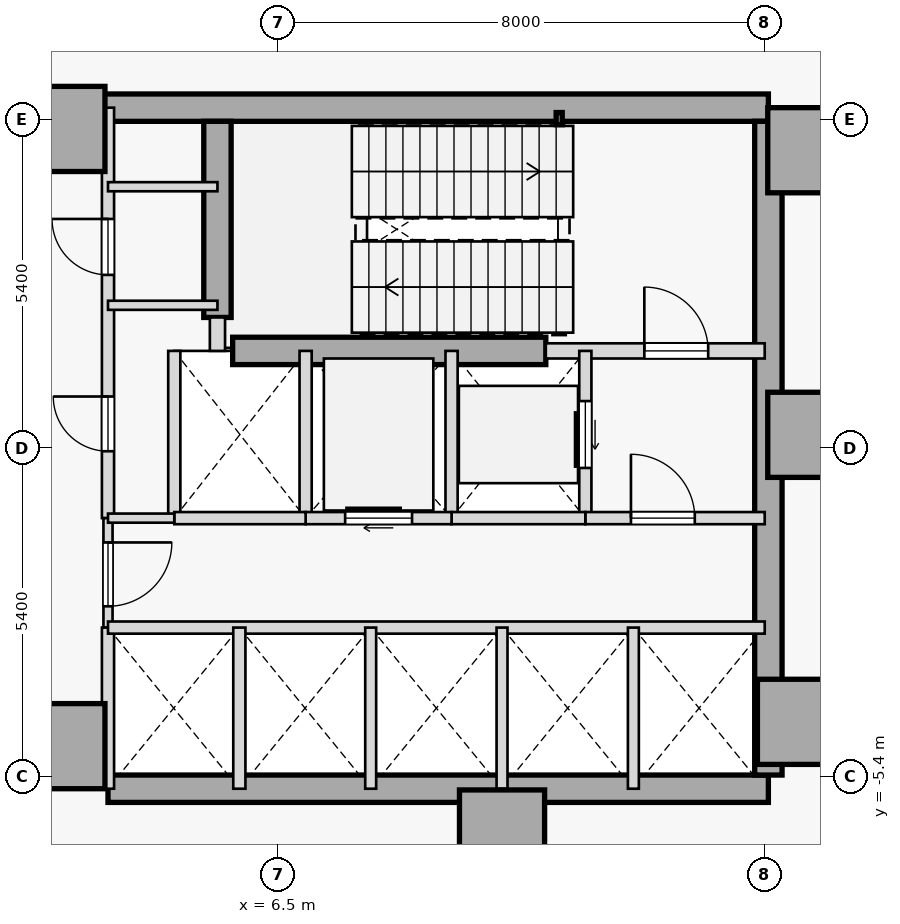
"""IFC4 building model, lengths in metres.
Left out: names, types, materials, properties, quantities, classifications, styles, units other than length and angle.
Written with IfcOpenShell. Run it as: python <this file> out.ifc"""

import sys

from ifc_helpers import new_model, si_unit, direction, frame, frame_2d, origin, origin_2d, place, context, subcontext, project, spatial, rectangle, hollow_rectangle, extrude, element, fill, save


model = new_model("IFC4")
c1 = context("Model", 3, precision=1e-05, world=origin(), true_north=direction((0.0, 1.0)))
c2 = subcontext(c1, "Body", "Model", "MODEL_VIEW")
j1 = project(units=[si_unit("LENGTHUNIT", "METRE"), si_unit("PLANEANGLEUNIT", "RADIAN")], contexts=[c1])
p1 = place(None, origin())
s1 = spatial("IfcSite", under=j1, at=p1, CompositionType="ELEMENT")
p2 = place(p1, origin())
s2 = spatial("IfcBuilding", under=s1, at=p2, CompositionType="ELEMENT")
p3 = place(p2, frame((0.0, 0.0, 9.6)))
s3 = spatial("IfcBuildingStorey", under=s2, at=p3, CompositionType="ELEMENT", Elevation=9.6)
for number, where, z_axis, x_axis in (
    (1, (15.25, 4.9, 0.0), (0.0, 0.0, 1.0), (1.0, 0.0, 0.0)),
    (2, (15.25, 0.22, 0.0), (0.0, 0.0, 1.0), (1.0, 0.0, 0.0)),
    (3, (15.08, -4.5, 0.0), (0.0, 0.0, 1.0), (1.0, 0.0, 0.0)),
    (4, (10.18, -6.32, 0.0), (0.0, 0.0, 1.0), (1.0, 0.0, 0.0)),
    (5, (2.95, -4.9, 0.0), (0.0, 0.0, 1.0), (1.0, 0.0, 0.0)),
    (6, (2.95, 5.25, 0.0), (0.0, 0.0, 1.0), (1.0, 0.0, 0.0)),
):
    element("IfcColumn", number, at=place(p3, frame(where, z_axis=z_axis, x_axis=x_axis)), inside=s3, PredefinedType="COLUMN", context=c2, shape_type="SweptSolid", body=[
        extrude(rectangle(XDim=1.4, YDim=1.4, at=origin_2d()), origin(), (0.0, 0.0, 1.0), 4.6),
    ])
p4 = place(p3, frame((3.15, 5.6, 0.0), z_axis=(0.0, 0.0, 1.0), x_axis=(1.0, 0.0, 0.0)))
e7 = element("IfcWall", 7, at=p4, inside=s3, PredefinedType="SHEAR", context=c2, shape_type="SweptSolid", body=[
    extrude(rectangle(XDim=11.41, YDim=0.45, at=frame_2d((5.705, 0.0))), origin(), (0.0, 0.0, 1.0), 4.375),
])
p5 = place(p3, frame((3.7, -5.6, 0.0), z_axis=(0.0, 0.0, 1.0), x_axis=(1.0, 0.0, 0.0)))
e8 = element("IfcWall", 8, at=p5, inside=s3, PredefinedType="SHEAR", context=c2, shape_type="SweptSolid", body=[
    extrude(rectangle(XDim=10.86, YDim=0.45, at=frame_2d((5.43, 0.0))), origin(), (0.0, 0.0, 1.0), 4.375),
])
p6 = place(p3, frame((14.56, -5.375, 0.0), z_axis=(0.0, 0.0, 1.0), x_axis=(0.0, 1.0, 0.0)))
e9 = element("IfcWall", 9, at=p6, inside=s3, PredefinedType="SHEAR", context=c2, shape_type="SweptSolid", body=[
    extrude(rectangle(XDim=10.75, YDim=0.45, at=frame_2d((5.375, 0.0))), origin(), (0.0, 0.0, 1.0), 4.375),
])
p7 = place(p3, frame((5.5, 2.15, 0.0), z_axis=(0.0, 0.0, 1.0), x_axis=(0.0, 1.0, 0.0)))
e10 = element("IfcWall", 10, at=p7, inside=s3, PredefinedType="SHEAR", context=c2, shape_type="SweptSolid", body=[
    extrude(rectangle(XDim=3.225, YDim=0.45, at=frame_2d((1.613, 0.0))), origin(), (0.0, 0.0, 1.0), 4.375),
])
p8 = place(p3, frame((5.75, 1.6, 0.0), z_axis=(0.0, 0.0, 1.0), x_axis=(1.0, 0.0, 0.0)))
e11 = element("IfcWall", 11, at=p8, inside=s3, PredefinedType="SHEAR", context=c2, shape_type="SweptSolid", body=[
    extrude(rectangle(XDim=5.15, YDim=0.45, at=frame_2d((2.575, 0.0))), origin(), (0.0, 0.0, 1.0), 4.375),
])
p9 = place(p3, frame((11.12, 5.42, 0.0), z_axis=(0.0, 0.0, 1.0), x_axis=(1.0, 0.0, 0.0)))
e12 = element("IfcColumn", 12, at=p9, inside=s3, PredefinedType="COLUMN", context=c2, shape_type="SweptSolid", body=[
    extrude(hollow_rectangle(XDim=0.1, YDim=0.2, WallThickness=0.008, at=origin_2d()), origin(), (0.0, 0.0, 1.0), 4.6),
])
p10 = place(p3, frame((10.9, 1.6, 0.0), z_axis=(0.0, 0.0, 1.0), x_axis=(1.0, 0.0, 0.0)))
e13 = element("IfcWall", 13, at=p10, inside=s3, PredefinedType="STANDARD", context=c2, shape_type="SweptSolid", body=[
    extrude(rectangle(XDim=3.6, YDim=0.25, at=frame_2d((1.8, 0.0))), origin(), (0.0, 0.0, 1.0), 4.375),
])
p11 = place(p10, frame((1.62, 0.0, 0.0)))
e14 = element("IfcOpeningElement", 14, at=p11, cuts=e13, PredefinedType="OPENING", context=c2, shape_type="SweptSolid", body=[
    extrude(rectangle(XDim=1.05, YDim=2.15, at=frame_2d((0.525, 1.075))), frame((0.0, 0.135, 0.0), z_axis=(0.0, -1.0, 0.0), x_axis=(1.0, 0.0, 0.0)), (0.0, 0.0, 1.0), 0.27),
])
p12 = place(p3, frame((5.5, 1.6, 0.0), z_axis=(0.0, 0.0, 1.0), x_axis=(0.0, 1.0, 0.0)))
e15 = element("IfcWall", 15, at=p12, inside=s3, PredefinedType="STANDARD", context=c2, shape_type="SweptSolid", body=[
    extrude(rectangle(XDim=0.55, YDim=0.25, at=frame_2d((0.275, 0.0))), origin(), (0.0, 0.0, 1.0), 4.375),
])
p13 = place(p3, frame((3.7, -1.15, 0.0), z_axis=(0.0, 0.0, 1.0), x_axis=(0.0, 1.0, 0.0)))
e16 = element("IfcWall", 16, at=p13, inside=s3, PredefinedType="STANDARD", context=c2, shape_type="SweptSolid", body=[
    extrude(rectangle(XDim=6.75, YDim=0.2, at=frame_2d((3.375, 0.0))), origin(), (0.0, 0.0, 1.0), 4.375),
])
p14 = place(p13, frame((1.1, 0.0, 0.0)))
e17 = element("IfcOpeningElement", 17, at=p14, cuts=e16, PredefinedType="OPENING", context=c2, shape_type="SweptSolid", body=[
    extrude(rectangle(XDim=0.9, YDim=2.15, at=frame_2d((0.45, 1.075))), frame((0.0, 0.11, 0.0), z_axis=(0.0, -1.0, 0.0), x_axis=(1.0, 0.0, 0.0)), (0.0, 0.0, 1.0), 0.22),
])
p15 = place(p13, frame((4.0, 0.0, 0.0)))
e18 = element("IfcOpeningElement", 18, at=p15, cuts=e16, PredefinedType="OPENING", context=c2, shape_type="SweptSolid", body=[
    extrude(rectangle(XDim=0.92, YDim=2.15, at=frame_2d((0.46, 1.075))), frame((0.0, 0.11, 0.0), z_axis=(0.0, -1.0, 0.0), x_axis=(1.0, 0.0, 0.0)), (0.0, 0.0, 1.0), 0.22),
])
p16 = place(p3, frame((3.7, -2.95, 0.0), z_axis=(0.0, 0.0, 1.0), x_axis=(0.0, 1.0, 0.0)))
e19 = element("IfcWall", 19, at=p16, inside=s3, PredefinedType="PARTITIONING", context=c2, shape_type="SweptSolid", body=[
    extrude(rectangle(XDim=1.8, YDim=0.15, at=frame_2d((0.9, 0.0))), origin(), (0.0, 0.0, 1.0), 4.375),
])
p17 = place(p16, frame((0.35, 0.0, 0.0)))
e20 = element("IfcOpeningElement", 20, at=p17, cuts=e19, PredefinedType="OPENING", context=c2, shape_type="SweptSolid", body=[
    extrude(rectangle(XDim=1.05, YDim=2.18, at=frame_2d((0.525, 1.09))), frame((0.0, 0.085, 0.0), z_axis=(0.0, -1.0, 0.0), x_axis=(1.0, 0.0, 0.0)), (0.0, 0.0, 1.0), 0.17),
])
p18 = place(p3, frame((3.7, -5.6, 0.0), z_axis=(0.0, 0.0, 1.0), x_axis=(0.0, 1.0, 0.0)))
e21 = element("IfcWall", 21, at=p18, inside=s3, PredefinedType="STANDARD", context=c2, shape_type="SweptSolid", body=[
    extrude(rectangle(XDim=2.65, YDim=0.2, at=frame_2d((1.325, 0.0))), origin(), (0.0, 0.0, 1.0), 4.375),
])
p19 = place(p3, frame((11.55, -1.15, 0.0), z_axis=(0.0, 0.0, 1.0), x_axis=(0.0, 1.0, 0.0)))
e22 = element("IfcWall", 22, at=p19, inside=s3, PredefinedType="STANDARD", context=c2, shape_type="SweptSolid", body=[
    extrude(rectangle(XDim=2.75, YDim=0.2, at=frame_2d((1.375, 0.0))), origin(), (0.0, 0.0, 1.0), 4.375),
])
p20 = place(p19, frame((0.825, 0.0, 0.0)))
e23 = element("IfcOpeningElement", 23, at=p20, cuts=e22, PredefinedType="OPENING", context=c2, shape_type="SweptSolid", body=[
    extrude(rectangle(XDim=1.1, YDim=2.15, at=frame_2d((0.55, 1.075))), frame((0.0, 0.11, 0.0), z_axis=(0.0, -1.0, 0.0), x_axis=(1.0, 0.0, 0.0)), (0.0, 0.0, 1.0), 0.22),
])
p21 = place(p3, frame((9.35, -1.15, 0.0), z_axis=(0.0, 0.0, 1.0), x_axis=(0.0, 1.0, 0.0)))
e24 = element("IfcWall", 24, at=p21, inside=s3, PredefinedType="STANDARD", context=c2, shape_type="SweptSolid", body=[
    extrude(rectangle(XDim=2.75, YDim=0.2, at=frame_2d((1.375, 0.0))), origin(), (0.0, 0.0, 1.0), 4.375),
])
p22 = place(p3, frame((11.55, -1.15, 0.0), z_axis=(0.0, 0.0, 1.0), x_axis=(1.0, 0.0, 0.0)))
e25 = element("IfcWall", 25, at=p22, inside=s3, PredefinedType="STANDARD", context=c2, shape_type="SweptSolid", body=[
    extrude(rectangle(XDim=2.95, YDim=0.2, at=frame_2d((1.475, 0.0))), origin(), (0.0, 0.0, 1.0), 4.375),
])
p23 = place(p22, frame((0.75, 0.0, 0.0)))
e26 = element("IfcOpeningElement", 26, at=p23, cuts=e25, PredefinedType="OPENING", context=c2, shape_type="SweptSolid", body=[
    extrude(rectangle(XDim=1.05, YDim=2.18, at=frame_2d((0.525, 1.09))), frame((0.0, 0.11, 0.0), z_axis=(0.0, -1.0, 0.0), x_axis=(1.0, 0.0, 0.0)), (0.0, 0.0, 1.0), 0.22),
])
p24 = place(p3, frame((9.35, -1.15, 0.0), z_axis=(0.0, 0.0, 1.0), x_axis=(1.0, 0.0, 0.0)))
e27 = element("IfcWall", 27, at=p24, inside=s3, PredefinedType="STANDARD", context=c2, shape_type="SweptSolid", body=[
    extrude(rectangle(XDim=2.2, YDim=0.2, at=frame_2d((1.1, 0.0))), origin(), (0.0, 0.0, 1.0), 4.375),
])
p25 = place(p3, frame((6.95, -1.15, 0.0), z_axis=(0.0, 0.0, 1.0), x_axis=(0.0, 1.0, 0.0)))
e28 = element("IfcWall", 28, at=p25, inside=s3, PredefinedType="STANDARD", context=c2, shape_type="SweptSolid", body=[
    extrude(rectangle(XDim=2.75, YDim=0.2, at=frame_2d((1.375, 0.0))), origin(), (0.0, 0.0, 1.0), 4.375),
])
p26 = place(p3, frame((6.95, -1.15, 0.0), z_axis=(0.0, 0.0, 1.0), x_axis=(1.0, 0.0, 0.0)))
e29 = element("IfcWall", 29, at=p26, inside=s3, PredefinedType="STANDARD", context=c2, shape_type="SweptSolid", body=[
    extrude(rectangle(XDim=2.4, YDim=0.2, at=frame_2d((1.2, 0.0))), origin(), (0.0, 0.0, 1.0), 4.375),
])
p27 = place(p26, frame((0.65, 0.0, 0.0)))
e30 = element("IfcOpeningElement", 30, at=p27, cuts=e29, PredefinedType="OPENING", context=c2, shape_type="SweptSolid", body=[
    extrude(rectangle(XDim=1.1, YDim=2.15, at=frame_2d((0.55, 1.075))), frame((0.0, 0.11, 0.0), z_axis=(0.0, -1.0, 0.0), x_axis=(1.0, 0.0, 0.0)), (0.0, 0.0, 1.0), 0.22),
])
p28 = place(p3, frame((4.79, -1.15, 0.0), z_axis=(0.0, 0.0, 1.0), x_axis=(0.0, 1.0, 0.0)))
e31 = element("IfcWall", 31, at=p28, inside=s3, PredefinedType="STANDARD", context=c2, shape_type="SweptSolid", body=[
    extrude(rectangle(XDim=2.75, YDim=0.2, at=frame_2d((1.375, 0.0))), origin(), (0.0, 0.0, 1.0), 4.375),
])
p29 = place(p3, frame((4.79, -1.15, 0.0), z_axis=(0.0, 0.0, 1.0), x_axis=(1.0, 0.0, 0.0)))
e32 = element("IfcWall", 32, at=p29, inside=s3, PredefinedType="STANDARD", context=c2, shape_type="SweptSolid", body=[
    extrude(rectangle(XDim=2.16, YDim=0.2, at=frame_2d((1.08, 0.0))), origin(), (0.0, 0.0, 1.0), 4.375),
])
p30 = place(p3, frame((3.7, -1.15, 0.0), z_axis=(0.0, 0.0, 1.0), x_axis=(1.0, 0.0, 0.0)))
e33 = element("IfcWall", 33, at=p30, inside=s3, PredefinedType="PARTITIONING", context=c2, shape_type="SweptSolid", body=[
    extrude(rectangle(XDim=1.09, YDim=0.15, at=frame_2d((0.545, 0.0))), origin(), (0.0, 0.0, 1.0), 4.375),
])
p31 = place(p3, frame((3.7, -2.95, 0.0), z_axis=(0.0, 0.0, 1.0), x_axis=(1.0, 0.0, 0.0)))
e34 = element("IfcWall", 34, at=p31, inside=s3, PredefinedType="STANDARD", context=c2, shape_type="SweptSolid", body=[
    extrude(rectangle(XDim=10.8, YDim=0.2, at=frame_2d((5.4, 0.0))), origin(), (0.0, 0.0, 1.0), 4.375),
])
p32 = place(p3, frame((5.86, -5.6, 0.0), z_axis=(0.0, 0.0, 1.0), x_axis=(0.0, 1.0, 0.0)))
e35 = element("IfcWall", 35, at=p32, inside=s3, PredefinedType="STANDARD", context=c2, shape_type="SweptSolid", body=[
    extrude(rectangle(XDim=2.65, YDim=0.2, at=frame_2d((1.325, 0.0))), origin(), (0.0, 0.0, 1.0), 4.375),
])
for number, where, z_axis, x_axis in (
    (36, (12.34, -5.6, 0.0), (0.0, 0.0, 1.0), (0.0, 1.0, 0.0)),
    (37, (10.18, -5.6, 0.0), (0.0, 0.0, 1.0), (0.0, 1.0, 0.0)),
    (38, (8.02, -5.6, 0.0), (0.0, 0.0, 1.0), (0.0, 1.0, 0.0)),
):
    element("IfcWall", number, at=place(p3, frame(where, z_axis=z_axis, x_axis=x_axis)), inside=s3, PredefinedType="STANDARD", context=c2, shape_type="SweptSolid", body=[
        extrude(rectangle(XDim=2.65, YDim=0.18, at=frame_2d((1.325, 0.0))), origin(), (0.0, 0.0, 1.0), 4.375),
    ])
for number, where, z_axis, x_axis in (
    (39, (3.7, 4.3, 0.0), (0.0, 0.0, 1.0), (1.0, 0.0, 0.0)),
    (40, (3.7, 2.35, 0.0), (0.0, 0.0, 1.0), (1.0, 0.0, 0.0)),
):
    element("IfcWall", number, at=place(p3, frame(where, z_axis=z_axis, x_axis=x_axis)), inside=s3, PredefinedType="PARTITIONING", context=c2, shape_type="SweptSolid", body=[
        extrude(rectangle(XDim=1.8, YDim=0.15, at=frame_2d((0.9, 0.0))), origin(), (0.0, 0.0, 1.0), 4.375),
    ])
p33 = place(p11, origin())
e41 = element("IfcDoor", 41, at=p33, inside=s3, OperationType="SINGLE_SWING_LEFT", PredefinedType="DOOR", context=c2, shape_type="SweptSolid", body=[
    extrude(rectangle(XDim=1.05, YDim=2.15, at=frame_2d((0.525, 1.075))), frame((0.0, 0.025, 0.0), z_axis=(0.0, -1.0, 0.0), x_axis=(1.0, 0.0, 0.0)), (0.0, 0.0, 1.0), 0.05),
])
fill(e14, e41)
p34 = place(p23, origin())
e42 = element("IfcDoor", 42, at=p34, inside=s3, OperationType="SINGLE_SWING_LEFT", PredefinedType="DOOR", context=c2, shape_type="SweptSolid", body=[
    extrude(rectangle(XDim=1.05, YDim=2.18, at=frame_2d((0.525, 1.09))), frame((0.0, 0.025, 0.0), z_axis=(0.0, -1.0, 0.0), x_axis=(1.0, 0.0, 0.0)), (0.0, 0.0, 1.0), 0.05),
])
fill(e26, e42)
p35 = place(p17, frame((1.05, 0.0, 0.0), z_axis=(0.0, 0.0, 1.0), x_axis=(-1.0, 0.0, 0.0)))
e43 = element("IfcDoor", 43, at=p35, inside=s3, OperationType="SINGLE_SWING_RIGHT", PredefinedType="DOOR", context=c2, shape_type="SweptSolid", body=[
    extrude(rectangle(XDim=1.05, YDim=2.18, at=frame_2d((0.525, 1.09))), frame((0.0, 0.025, 0.0), z_axis=(0.0, -1.0, 0.0), x_axis=(1.0, 0.0, 0.0)), (0.0, 0.0, 1.0), 0.05),
])
fill(e20, e43)
p36 = place(p20, origin())
e44 = element("IfcDoor", 44, at=p36, inside=s3, OperationType="SLIDING_TO_RIGHT", PredefinedType="DOOR", context=c2, shape_type="SweptSolid", body=[
    extrude(rectangle(XDim=1.1, YDim=2.15, at=frame_2d((0.55, 1.075))), frame((0.0, 0.025, 0.0), z_axis=(0.0, -1.0, 0.0), x_axis=(1.0, 0.0, 0.0)), (0.0, 0.0, 1.0), 0.05),
])
fill(e23, e44)
p37 = place(p27, origin())
e45 = element("IfcDoor", 45, at=p37, inside=s3, OperationType="SLIDING_TO_RIGHT", PredefinedType="DOOR", context=c2, shape_type="SweptSolid", body=[
    extrude(rectangle(XDim=1.1, YDim=2.15, at=frame_2d((0.55, 1.075))), frame((0.0, 0.025, 0.0), z_axis=(0.0, -1.0, 0.0), x_axis=(1.0, 0.0, 0.0)), (0.0, 0.0, 1.0), 0.05),
])
fill(e30, e45)
p38 = place(p14, origin())
e46 = element("IfcDoor", 46, at=p38, inside=s3, OperationType="SINGLE_SWING_RIGHT", PredefinedType="DOOR", context=c2, shape_type="SweptSolid", body=[
    extrude(rectangle(XDim=0.9, YDim=2.15, at=frame_2d((0.45, 1.075))), frame((0.0, 0.025, 0.0), z_axis=(0.0, -1.0, 0.0), x_axis=(1.0, 0.0, 0.0)), (0.0, 0.0, 1.0), 0.05),
])
fill(e17, e46)
p39 = place(p15, origin())
e47 = element("IfcDoor", 47, at=p39, inside=s3, OperationType="SINGLE_SWING_RIGHT", PredefinedType="DOOR", context=c2, shape_type="SweptSolid", body=[
    extrude(rectangle(XDim=0.92, YDim=2.15, at=frame_2d((0.46, 1.075))), frame((0.0, 0.025, 0.0), z_axis=(0.0, -1.0, 0.0), x_axis=(1.0, 0.0, 0.0)), (0.0, 0.0, 1.0), 0.05),
])
fill(e18, e47)
save(model, sys.argv[1])
